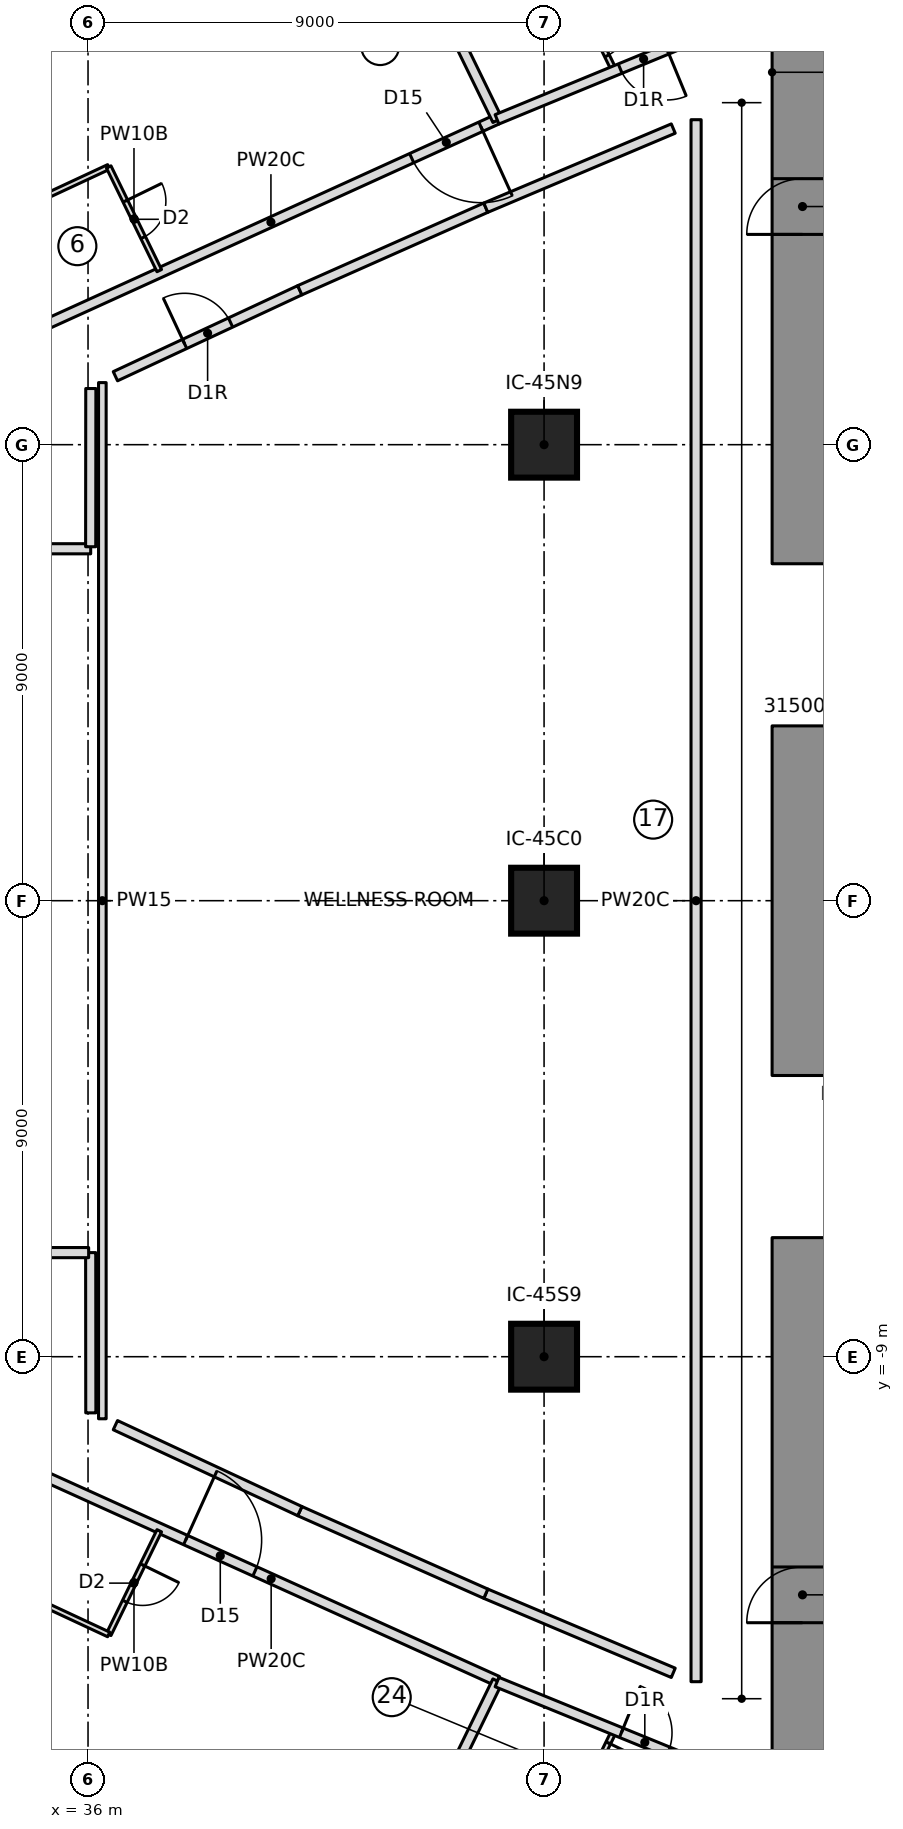
"""IFC4 building model, lengths in metres.
Left out: names, types, materials, properties, quantities, classifications, styles, units other than length and angle.
Written with IfcOpenShell. Run it as: python <this file> out.ifc"""

import sys

from ifc_helpers import new_model, si_unit, direction, frame, frame_2d, origin, origin_2d, place, context, subcontext, project, spatial, rectangle, extrude, element, fill, save


model = new_model("IFC4")
c1 = context("Model", 3, precision=1e-05, world=origin(), true_north=direction((0.0, 1.0)))
c2 = subcontext(c1, "Body", "Model", "MODEL_VIEW")
j1 = project(units=[si_unit("LENGTHUNIT", "METRE"), si_unit("PLANEANGLEUNIT", "RADIAN")], contexts=[c1])
p1 = place(None, origin())
s1 = spatial("IfcSite", under=j1, at=p1, CompositionType="ELEMENT")
p2 = place(p1, origin())
s2 = spatial("IfcBuilding", under=s1, at=p2, CompositionType="ELEMENT")
p3 = place(p2, frame((0.0, 0.0, 60.9)))
s3 = spatial("IfcBuildingStorey", under=s2, at=p3, CompositionType="ELEMENT", Elevation=60.9)
p4 = place(p3, frame((50.1, 6.65, 0.0), z_axis=(0.0, 0.0, 1.0), x_axis=(0.0, 1.0, 0.0)))
e1 = element("IfcWall", 1, at=p4, inside=s3, PredefinedType="SHEAR", context=c2, shape_type="SweptSolid", body=[
    extrude(rectangle(XDim=10.3, YDim=1.2, at=frame_2d((5.15, 0.0))), origin(), (0.0, 0.0, 1.0), 3.55),
])
p5 = place(p4, frame((6.5, 0.0, 0.0)))
e2 = element("IfcOpeningElement", 2, at=p5, cuts=e1, PredefinedType="OPENING", context=c2, shape_type="SweptSolid", body=[
    extrude(rectangle(XDim=1.1, YDim=2.1, at=frame_2d((0.55, 1.05))), frame((0.0, 0.61, 0.0), z_axis=(0.0, -1.0, 0.0), x_axis=(1.0, 0.0, 0.0)), (0.0, 0.0, 1.0), 1.22),
])
p6 = place(p3, frame((50.1, -3.45, 0.0), z_axis=(0.0, 0.0, 1.0), x_axis=(0.0, 1.0, 0.0)))
e3 = element("IfcWall", 3, at=p6, inside=s3, PredefinedType="SHEAR", context=c2, shape_type="SweptSolid", body=[
    extrude(rectangle(XDim=6.9, YDim=1.2, at=frame_2d((3.45, 0.0))), origin(), (0.0, 0.0, 1.0), 3.55),
])
p7 = place(p3, frame((50.1, -16.95, 0.0), z_axis=(0.0, 0.0, 1.0), x_axis=(0.0, 1.0, 0.0)))
e4 = element("IfcWall", 4, at=p7, inside=s3, PredefinedType="SHEAR", context=c2, shape_type="SweptSolid", body=[
    extrude(rectangle(XDim=10.3, YDim=1.2, at=frame_2d((5.15, 0.0))), origin(), (0.0, 0.0, 1.0), 3.55),
])
p8 = place(p7, frame((2.7, 0.0, 0.0)))
e5 = element("IfcOpeningElement", 5, at=p8, cuts=e4, PredefinedType="OPENING", context=c2, shape_type="SweptSolid", body=[
    extrude(rectangle(XDim=1.1, YDim=2.1, at=frame_2d((0.55, 1.05))), frame((0.0, 0.61, 0.0), z_axis=(0.0, -1.0, 0.0), x_axis=(1.0, 0.0, 0.0)), (0.0, 0.0, 1.0), 1.22),
])
for number, where, z_axis, x_axis in (
    (6, (45.0, -9.0, 0.0), (0.0, 0.0, 1.0), (1.0, 0.0, 0.0)),
    (7, (45.0, 0.0, 0.0), (0.0, 0.0, 1.0), (1.0, 0.0, 0.0)),
    (8, (45.0, 9.0, 0.0), (0.0, 0.0, 1.0), (1.0, 0.0, 0.0)),
):
    element("IfcColumn", number, at=place(p3, frame(where, z_axis=z_axis, x_axis=x_axis)), inside=s3, PredefinedType="COLUMN", context=c2, shape_type="SweptSolid", body=[
        extrude(rectangle(XDim=1.3, YDim=1.3, at=origin_2d()), origin(), (0.0, 0.0, 1.0), 3.55),
    ])
p9 = place(p3, frame((44.072, 15.421, 0.0), z_axis=(0.0, 0.0, 1.0), x_axis=(-0.910287143541, -0.413977434534, 0.0)))
e9 = element("IfcWall", 9, at=p9, inside=s3, PredefinedType="PARTITIONING", context=c2, shape_type="SweptSolid", body=[
    extrude(rectangle(XDim=9.803, YDim=0.2, at=frame_2d((4.902, 0.0))), origin(), (0.0, 0.0, 1.0), 3.25),
])
p10 = place(p9, frame((0.35, 0.0, 0.0)))
e10 = element("IfcOpeningElement", 10, at=p10, cuts=e9, PredefinedType="OPENING", context=c2, shape_type="SweptSolid", body=[
    extrude(rectangle(XDim=1.5, YDim=2.1, at=frame_2d((0.75, 1.05))), frame((0.0, 0.11, 0.0), z_axis=(0.0, -1.0, 0.0), x_axis=(1.0, 0.0, 0.0)), (0.0, 0.0, 1.0), 0.22),
])
p11 = place(p3, frame((34.903, 13.781, 0.0), z_axis=(0.0, 0.0, 1.0), x_axis=(0.906434605418, 0.422346192242, 0.0)))
e11 = element("IfcWall", 11, at=p11, inside=s3, PredefinedType="PARTITIONING", context=c2, shape_type="SweptSolid", body=[
    extrude(rectangle(XDim=1.661, YDim=0.1, at=frame_2d((0.83, 0.0))), origin(), (0.0, 0.0, 1.0), 3.25),
])
p12 = place(p3, frame((36.408, 14.482, 0.0), z_axis=(0.0, 0.0, 1.0), x_axis=(0.438271544149, -0.898842618921, 0.0)))
e12 = element("IfcWall", 12, at=p12, inside=s3, PredefinedType="PARTITIONING", context=c2, shape_type="SweptSolid", body=[
    extrude(rectangle(XDim=2.277, YDim=0.1, at=frame_2d((1.139, 0.0))), origin(), (0.0, 0.0, 1.0), 3.25),
])
p13 = place(p12, frame((0.75, 0.0, 0.0)))
e13 = element("IfcOpeningElement", 13, at=p13, cuts=e12, PredefinedType="OPENING", context=c2, shape_type="SweptSolid", body=[
    extrude(rectangle(XDim=0.8, YDim=2.1, at=frame_2d((0.4, 1.05))), frame((0.0, 0.06, 0.0), z_axis=(0.0, -1.0, 0.0), x_axis=(1.0, 0.0, 0.0)), (0.0, 0.0, 1.0), 0.12),
])
p14 = place(p3, frame((44.08, 15.403, 0.0), z_axis=(0.0, 0.0, 1.0), x_axis=(-0.438196739796, 0.898879089328, 0.0)))
e14 = element("IfcWall", 14, at=p14, inside=s3, PredefinedType="PARTITIONING", context=c2, shape_type="SweptSolid", body=[
    extrude(rectangle(XDim=7.611, YDim=0.2, at=frame_2d((3.806, 0.0))), origin(), (0.0, 0.0, 1.0), 3.25),
])
p15 = place(p3, frame((45.65, 17.888, 0.0), z_axis=(0.0, 0.0, 1.0), x_axis=(0.438301838547, -0.89882784688, 0.0)))
e15 = element("IfcWall", 15, at=p15, inside=s3, PredefinedType="PARTITIONING", context=c2, shape_type="SweptSolid", body=[
    extrude(rectangle(XDim=1.659, YDim=0.1, at=frame_2d((0.829, 0.0))), origin(), (0.0, 0.0, 1.0), 3.25),
])
p16 = place(p15, frame((0.55, 0.0, 0.0)))
e16 = element("IfcOpeningElement", 16, at=p16, cuts=e15, PredefinedType="OPENING", context=c2, shape_type="SweptSolid", body=[
    extrude(rectangle(XDim=0.8, YDim=2.1, at=frame_2d((0.4, 1.05))), frame((0.0, 0.06, 0.0), z_axis=(0.0, -1.0, 0.0), x_axis=(1.0, 0.0, 0.0)), (0.0, 0.0, 1.0), 0.12),
])
p17 = place(p3, frame((35.148, -11.362, 0.0), z_axis=(0.0, 0.0, 1.0), x_axis=(0.9111333041, -0.412111759308, 0.0)))
e17 = element("IfcWall", 17, at=p17, inside=s3, PredefinedType="PARTITIONING", context=c2, shape_type="SweptSolid", body=[
    extrude(rectangle(XDim=9.804, YDim=0.2, at=frame_2d((4.902, 0.0))), origin(), (0.0, 0.0, 1.0), 3.25),
])
p18 = place(p17, frame((3.05, 0.0, 0.0)))
e18 = element("IfcOpeningElement", 18, at=p18, cuts=e17, PredefinedType="OPENING", context=c2, shape_type="SweptSolid", body=[
    extrude(rectangle(XDim=1.5, YDim=2.1, at=frame_2d((0.75, 1.05))), frame((0.0, 0.11, 0.0), z_axis=(0.0, -1.0, 0.0), x_axis=(1.0, 0.0, 0.0)), (0.0, 0.0, 1.0), 0.22),
])
p19 = place(p3, frame((37.406, -12.435, 0.0), z_axis=(0.0, 0.0, 1.0), x_axis=(-0.438271544149, -0.898842618921, 0.0)))
e19 = element("IfcWall", 19, at=p19, inside=s3, PredefinedType="PARTITIONING", context=c2, shape_type="SweptSolid", body=[
    extrude(rectangle(XDim=2.277, YDim=0.1, at=frame_2d((1.139, 0.0))), origin(), (0.0, 0.0, 1.0), 3.25),
])
p20 = place(p19, frame((0.75, 0.0, 0.0)))
e20 = element("IfcOpeningElement", 20, at=p20, cuts=e19, PredefinedType="OPENING", context=c2, shape_type="SweptSolid", body=[
    extrude(rectangle(XDim=0.8, YDim=2.1, at=frame_2d((0.4, 1.05))), frame((0.0, 0.06, 0.0), z_axis=(0.0, -1.0, 0.0), x_axis=(1.0, 0.0, 0.0)), (0.0, 0.0, 1.0), 0.12),
])
p21 = place(p3, frame((36.408, -14.482, 0.0), z_axis=(0.0, 0.0, 1.0), x_axis=(-0.906434605418, 0.422346192242, 0.0)))
e21 = element("IfcWall", 21, at=p21, inside=s3, PredefinedType="PARTITIONING", context=c2, shape_type="SweptSolid", body=[
    extrude(rectangle(XDim=1.661, YDim=0.1, at=frame_2d((0.83, 0.0))), origin(), (0.0, 0.0, 1.0), 3.25),
])
p22 = place(p3, frame((40.745, -22.244, 0.0), z_axis=(0.0, 0.0, 1.0), x_axis=(0.438196739796, 0.898879089328, 0.0)))
e22 = element("IfcWall", 22, at=p22, inside=s3, PredefinedType="PARTITIONING", context=c2, shape_type="SweptSolid", body=[
    extrude(rectangle(XDim=7.611, YDim=0.2, at=frame_2d((3.806, 0.0))), origin(), (0.0, 0.0, 1.0), 3.25),
])
p23 = place(p3, frame((46.377, -16.397, 0.0), z_axis=(0.0, 0.0, 1.0), x_axis=(-0.438301838547, -0.89882784688, 0.0)))
e23 = element("IfcWall", 23, at=p23, inside=s3, PredefinedType="PARTITIONING", context=c2, shape_type="SweptSolid", body=[
    extrude(rectangle(XDim=1.659, YDim=0.1, at=frame_2d((0.829, 0.0))), origin(), (0.0, 0.0, 1.0), 3.25),
])
p24 = place(p23, frame((0.25, 0.0, 0.0)))
e24 = element("IfcOpeningElement", 24, at=p24, cuts=e23, PredefinedType="OPENING", context=c2, shape_type="SweptSolid", body=[
    extrude(rectangle(XDim=0.8, YDim=2.1, at=frame_2d((0.4, 1.05))), frame((0.0, 0.06, 0.0), z_axis=(0.0, -1.0, 0.0), x_axis=(1.0, 0.0, 0.0)), (0.0, 0.0, 1.0), 0.12),
])
p25 = place(p3, frame((36.283, -10.225, 0.0), z_axis=(0.0, 0.0, 1.0), x_axis=(0.0, 1.0, 0.0)))
e25 = element("IfcWall", 25, at=p25, inside=s3, PredefinedType="PARTITIONING", context=c2, shape_type="SweptSolid", body=[
    extrude(rectangle(XDim=20.45, YDim=0.15, at=frame_2d((10.225, 0.0))), origin(), (0.0, 0.0, 1.0), 3.25),
])
p26 = place(p3, frame((36.54, 10.351, 0.0), z_axis=(0.0, 0.0, 1.0), x_axis=(0.906347708834, 0.42253263861, 0.0)))
e26 = element("IfcWall", 26, at=p26, inside=s3, PredefinedType="PARTITIONING", context=c2, shape_type="SweptSolid", body=[
    extrude(rectangle(XDim=4.016, YDim=0.2, at=frame_2d((2.008, 0.0))), origin(), (0.0, 0.0, 1.0), 3.25),
])
p27 = place(p26, frame((1.508, 0.0, 0.0)))
e27 = element("IfcOpeningElement", 27, at=p27, cuts=e26, PredefinedType="OPENING", context=c2, shape_type="SweptSolid", body=[
    extrude(rectangle(XDim=1.0, YDim=2.1, at=frame_2d((0.5, 1.05))), frame((0.0, 0.11, 0.0), z_axis=(0.0, -1.0, 0.0), x_axis=(1.0, 0.0, 0.0)), (0.0, 0.0, 1.0), 0.22),
])
p28 = place(p3, frame((40.18, 12.048, 0.0), z_axis=(0.0, 0.0, 1.0), x_axis=(0.913986953061, 0.405743576209, 0.0)))
e28 = element("IfcWall", 28, at=p28, inside=s3, PredefinedType="PARTITIONING", context=c2, shape_type="SweptSolid", body=[
    extrude(rectangle(XDim=4.016, YDim=0.2, at=frame_2d((2.008, 0.0))), origin(), (0.0, 0.0, 1.0), 3.25),
])
for number, where, z_axis, x_axis in (
    (29, (43.85, 13.677, 0.0), (0.0, 0.0, 1.0), (0.921, 0.389, 0.0)),
    (30, (47.55, -15.239, 0.0), (0.0, 0.0, 1.0), (-0.921, 0.389, 0.0)),
):
    element("IfcWall", number, at=place(p3, frame(where, z_axis=z_axis, x_axis=x_axis)), inside=s3, PredefinedType="PARTITIONING", context=c2, shape_type="SweptSolid", body=[
        extrude(rectangle(XDim=4.016, YDim=0.2, at=frame_2d((2.008, 0.0))), origin(), (0.0, 0.0, 1.0), 3.25),
    ])
p29 = place(p3, frame((43.85, -13.677, 0.0), z_axis=(0.0, 0.0, 1.0), x_axis=(-0.913986953061, 0.405743576209, 0.0)))
e31 = element("IfcWall", 31, at=p29, inside=s3, PredefinedType="PARTITIONING", context=c2, shape_type="SweptSolid", body=[
    extrude(rectangle(XDim=4.016, YDim=0.2, at=frame_2d((2.008, 0.0))), origin(), (0.0, 0.0, 1.0), 3.25),
])
p30 = place(p3, frame((40.18, -12.048, 0.0), z_axis=(0.0, 0.0, 1.0), x_axis=(-0.906347708834, 0.42253263861, 0.0)))
e32 = element("IfcWall", 32, at=p30, inside=s3, PredefinedType="PARTITIONING", context=c2, shape_type="SweptSolid", body=[
    extrude(rectangle(XDim=4.016, YDim=0.2, at=frame_2d((2.008, 0.0))), origin(), (0.0, 0.0, 1.0), 3.25),
])
p31 = place(p3, frame((47.704, 16.917, 0.0), z_axis=(0.0, 0.0, 1.0), x_axis=(-0.924573816857, -0.381002962169, 0.0)))
e33 = element("IfcWall", 33, at=p31, inside=s3, PredefinedType="PARTITIONING", context=c2, shape_type="SweptSolid", body=[
    extrude(rectangle(XDim=3.929, YDim=0.2, at=frame_2d((1.964, 0.0))), origin(), (0.0, 0.0, 1.0), 3.25),
])
p32 = place(p31, frame((0.3, 0.0, 0.0)))
e34 = element("IfcOpeningElement", 34, at=p32, cuts=e33, PredefinedType="OPENING", context=c2, shape_type="SweptSolid", body=[
    extrude(rectangle(XDim=1.0, YDim=2.1, at=frame_2d((0.5, 1.05))), frame((0.0, 0.11, 0.0), z_axis=(0.0, -1.0, 0.0), x_axis=(1.0, 0.0, 0.0)), (0.0, 0.0, 1.0), 0.22),
])
p33 = place(p3, frame((44.072, -15.421, 0.0), z_axis=(0.0, 0.0, 1.0), x_axis=(0.925861862022, -0.377862160653, 0.0)))
e35 = element("IfcWall", 35, at=p33, inside=s3, PredefinedType="PARTITIONING", context=c2, shape_type="SweptSolid", body=[
    extrude(rectangle(XDim=3.923, YDim=0.2, at=frame_2d((1.961, 0.0))), origin(), (0.0, 0.0, 1.0), 3.25),
])
p34 = place(p33, frame((2.65, 0.0, 0.0)))
e36 = element("IfcOpeningElement", 36, at=p34, cuts=e35, PredefinedType="OPENING", context=c2, shape_type="SweptSolid", body=[
    extrude(rectangle(XDim=1.0, YDim=2.1, at=frame_2d((0.5, 1.05))), frame((0.0, 0.11, 0.0), z_axis=(0.0, -1.0, 0.0), x_axis=(1.0, 0.0, 0.0)), (0.0, 0.0, 1.0), 0.22),
])
p35 = place(p3, frame((36.055, -10.108, 0.0), z_axis=(0.0, 0.0, 1.0), x_axis=(-0.00077190251, 0.999999702083, 0.0)))
e37 = element("IfcWall", 37, at=p35, inside=s3, PredefinedType="PARTITIONING", context=c2, shape_type="SweptSolid", body=[
    extrude(rectangle(XDim=3.163, YDim=0.2, at=frame_2d((1.582, 0.0))), origin(), (0.0, 0.0, 1.0), 3.25),
])
for number, where, z_axis, x_axis in (
    (38, (36.012, -6.946, 0.0), (0.0, 0.0, 1.0), (-1.0, 6.007e-05, 0.0)),
    (39, (31.989, 6.945, 0.0), (0.0, 0.0, 1.0), (1.0, 6.007e-05, 0.0)),
):
    element("IfcWall", number, at=place(p3, frame(where, z_axis=z_axis, x_axis=x_axis)), inside=s3, PredefinedType="PARTITIONING", context=c2, shape_type="SweptSolid", body=[
        extrude(rectangle(XDim=4.064, YDim=0.2, at=frame_2d((2.032, 0.0))), origin(), (0.0, 0.0, 1.0), 3.25),
    ])
p36 = place(p3, frame((36.052, 6.986, 0.0), z_axis=(0.0, 0.0, 1.0), x_axis=(0.000781799464, 0.999999694395, 0.0)))
e40 = element("IfcWall", 40, at=p36, inside=s3, PredefinedType="PARTITIONING", context=c2, shape_type="SweptSolid", body=[
    extrude(rectangle(XDim=3.123, YDim=0.2, at=frame_2d((1.562, 0.0))), origin(), (0.0, 0.0, 1.0), 3.25),
])
p37 = place(p3, frame((48.0, 15.414, 0.0), z_axis=(0.0, 0.0, 1.0), x_axis=(0.0, -1.0, 0.0)))
e41 = element("IfcWall", 41, at=p37, inside=s3, PredefinedType="PARTITIONING", context=c2, shape_type="SweptSolid", body=[
    extrude(rectangle(XDim=30.828, YDim=0.2, at=frame_2d((15.414, 0.0))), origin(), (0.0, 0.0, 1.0), 3.25),
])
p38 = place(p13, origin())
e42 = element("IfcDoor", 42, at=p38, inside=s3, OperationType="SINGLE_SWING_LEFT", PredefinedType="DOOR", context=c2, shape_type="SweptSolid", body=[
    extrude(rectangle(XDim=0.8, YDim=2.1, at=frame_2d((0.4, 1.05))), frame((0.0, 0.025, 0.0), z_axis=(0.0, -1.0, 0.0), x_axis=(1.0, 0.0, 0.0)), (0.0, 0.0, 1.0), 0.05),
])
fill(e13, e42)
p39 = place(p10, origin())
e43 = element("IfcDoor", 43, at=p39, inside=s3, OperationType="DOUBLE_DOOR_SINGLE_SWING", PredefinedType="DOOR", context=c2, shape_type="SweptSolid", body=[
    extrude(rectangle(XDim=1.5, YDim=2.1, at=frame_2d((0.75, 1.05))), frame((0.0, 0.025, 0.0), z_axis=(0.0, -1.0, 0.0), x_axis=(1.0, 0.0, 0.0)), (0.0, 0.0, 1.0), 0.05),
])
fill(e10, e43)
p40 = place(p16, origin())
e44 = element("IfcDoor", 44, at=p40, inside=s3, OperationType="SINGLE_SWING_LEFT", PredefinedType="DOOR", context=c2, shape_type="SweptSolid", body=[
    extrude(rectangle(XDim=0.8, YDim=2.1, at=frame_2d((0.4, 1.05))), frame((0.0, 0.025, 0.0), z_axis=(0.0, -1.0, 0.0), x_axis=(1.0, 0.0, 0.0)), (0.0, 0.0, 1.0), 0.05),
])
fill(e16, e44)
p41 = place(p32, origin())
e45 = element("IfcDoor", 45, at=p41, inside=s3, OperationType="SINGLE_SWING_RIGHT", PredefinedType="DOOR", context=c2, shape_type="SweptSolid", body=[
    extrude(rectangle(XDim=1.0, YDim=2.1, at=frame_2d((0.5, 1.05))), frame((0.0, 0.025, 0.0), z_axis=(0.0, -1.0, 0.0), x_axis=(1.0, 0.0, 0.0)), (0.0, 0.0, 1.0), 0.05),
])
fill(e34, e45)
p42 = place(p20, origin())
e46 = element("IfcDoor", 46, at=p42, inside=s3, OperationType="SINGLE_SWING_LEFT", PredefinedType="DOOR", context=c2, shape_type="SweptSolid", body=[
    extrude(rectangle(XDim=0.8, YDim=2.1, at=frame_2d((0.4, 1.05))), frame((0.0, 0.025, 0.0), z_axis=(0.0, -1.0, 0.0), x_axis=(1.0, 0.0, 0.0)), (0.0, 0.0, 1.0), 0.05),
])
fill(e20, e46)
p43 = place(p18, origin())
e47 = element("IfcDoor", 47, at=p43, inside=s3, OperationType="DOUBLE_DOOR_SINGLE_SWING", PredefinedType="DOOR", context=c2, shape_type="SweptSolid", body=[
    extrude(rectangle(XDim=1.5, YDim=2.1, at=frame_2d((0.75, 1.05))), frame((0.0, 0.025, 0.0), z_axis=(0.0, -1.0, 0.0), x_axis=(1.0, 0.0, 0.0)), (0.0, 0.0, 1.0), 0.05),
])
fill(e18, e47)
p44 = place(p24, origin())
e48 = element("IfcDoor", 48, at=p44, inside=s3, OperationType="SINGLE_SWING_LEFT", PredefinedType="DOOR", context=c2, shape_type="SweptSolid", body=[
    extrude(rectangle(XDim=0.8, YDim=2.1, at=frame_2d((0.4, 1.05))), frame((0.0, 0.025, 0.0), z_axis=(0.0, -1.0, 0.0), x_axis=(1.0, 0.0, 0.0)), (0.0, 0.0, 1.0), 0.05),
])
fill(e24, e48)
p45 = place(p34, origin())
e49 = element("IfcDoor", 49, at=p45, inside=s3, OperationType="SINGLE_SWING_RIGHT", PredefinedType="DOOR", context=c2, shape_type="SweptSolid", body=[
    extrude(rectangle(XDim=1.0, YDim=2.1, at=frame_2d((0.5, 1.05))), frame((0.0, 0.025, 0.0), z_axis=(0.0, -1.0, 0.0), x_axis=(1.0, 0.0, 0.0)), (0.0, 0.0, 1.0), 0.05),
])
fill(e36, e49)
p46 = place(p27, origin())
e50 = element("IfcDoor", 50, at=p46, inside=s3, OperationType="SINGLE_SWING_RIGHT", PredefinedType="DOOR", context=c2, shape_type="SweptSolid", body=[
    extrude(rectangle(XDim=1.0, YDim=2.1, at=frame_2d((0.5, 1.05))), frame((0.0, 0.025, 0.0), z_axis=(0.0, -1.0, 0.0), x_axis=(1.0, 0.0, 0.0)), (0.0, 0.0, 1.0), 0.05),
])
fill(e27, e50)
p47 = place(p5, origin())
e51 = element("IfcDoor", 51, at=p47, inside=s3, OperationType="SINGLE_SWING_RIGHT", PredefinedType="DOOR", context=c2, shape_type="SweptSolid", body=[
    extrude(rectangle(XDim=1.1, YDim=2.1, at=frame_2d((0.55, 1.05))), frame((0.0, 0.025, 0.0), z_axis=(0.0, -1.0, 0.0), x_axis=(1.0, 0.0, 0.0)), (0.0, 0.0, 1.0), 0.05),
])
fill(e2, e51)
p48 = place(p8, origin())
e52 = element("IfcDoor", 52, at=p48, inside=s3, OperationType="SINGLE_SWING_RIGHT", PredefinedType="DOOR", context=c2, shape_type="SweptSolid", body=[
    extrude(rectangle(XDim=1.1, YDim=2.1, at=frame_2d((0.55, 1.05))), frame((0.0, 0.025, 0.0), z_axis=(0.0, -1.0, 0.0), x_axis=(1.0, 0.0, 0.0)), (0.0, 0.0, 1.0), 0.05),
])
fill(e5, e52)
save(model, sys.argv[1])
